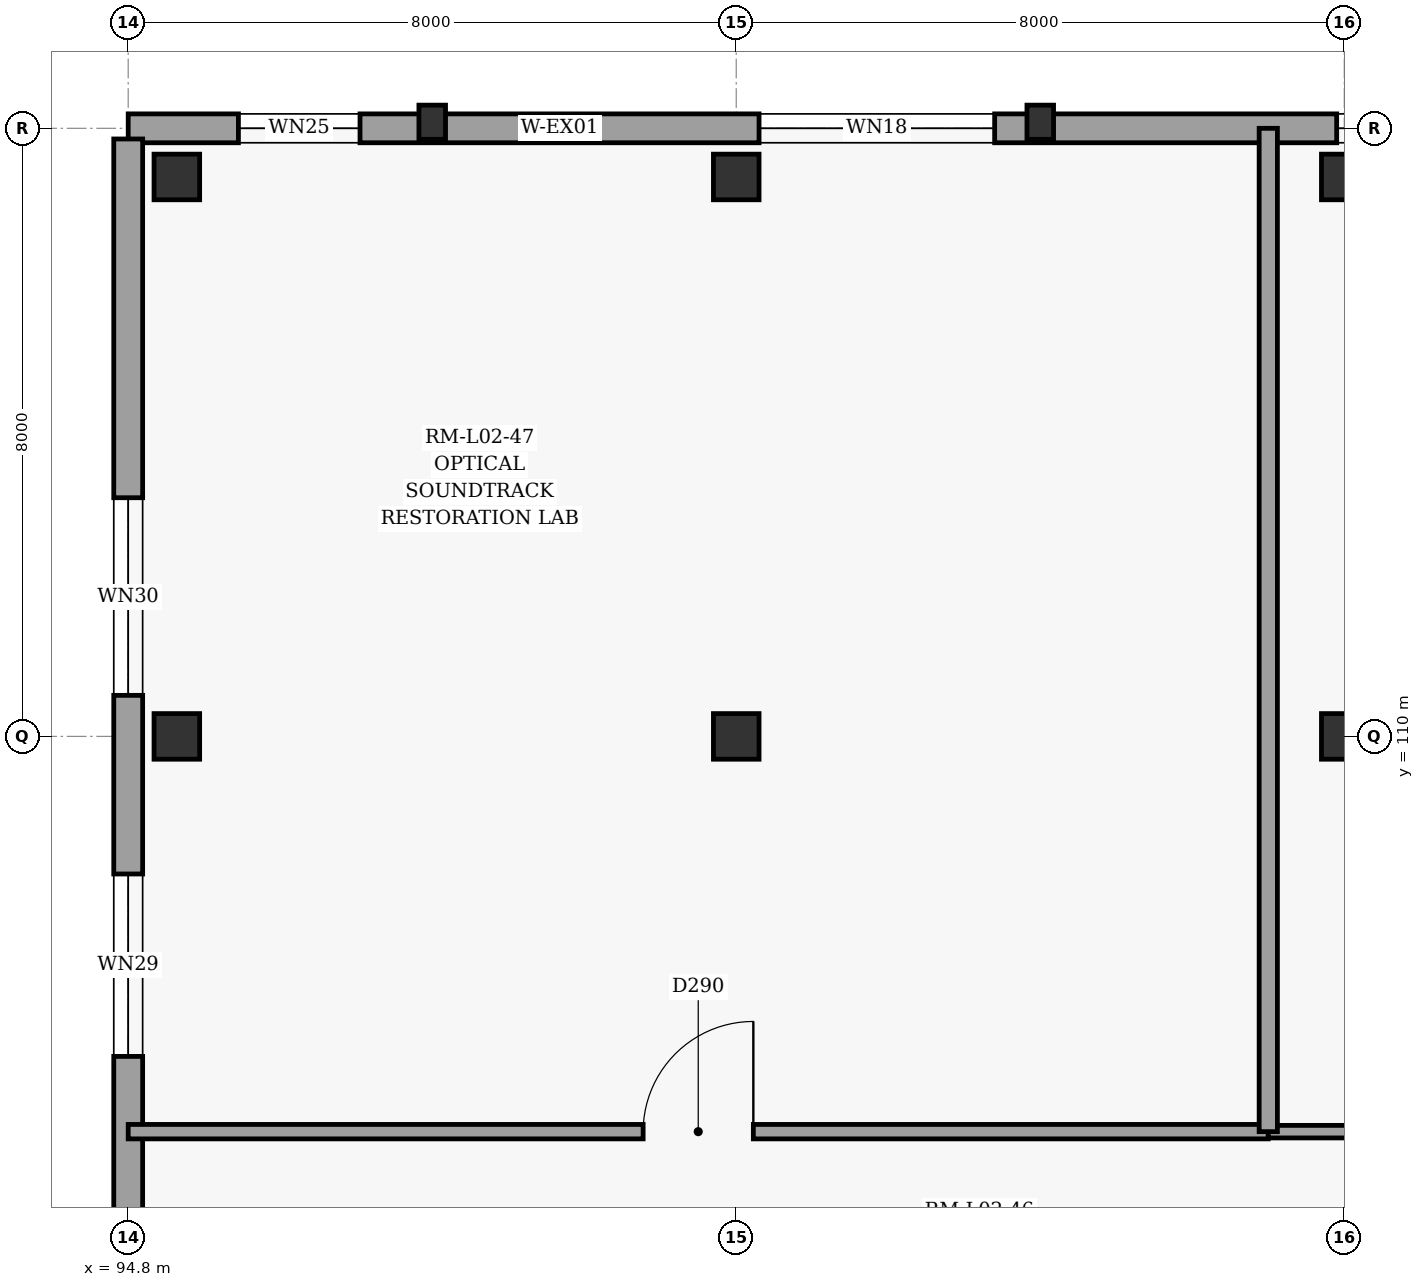
"""IFC4 building model, lengths in metres.
Left out: names, types, materials, properties, quantities, classifications, styles, units other than length and angle.
Written with IfcOpenShell. Run it as: python <this file> out.ifc"""

import sys

from ifc_helpers import new_model, si_unit, direction, frame, frame_2d, origin, origin_2d, place, context, subcontext, project, spatial, rectangle, extrude, element, fill, save


model = new_model("IFC4")
c1 = context("Model", 3, precision=1e-05, world=origin(), true_north=direction((0.0, 1.0)))
c2 = subcontext(c1, "Body", "Model", "MODEL_VIEW")
j1 = project(units=[si_unit("LENGTHUNIT", "METRE"), si_unit("PLANEANGLEUNIT", "RADIAN")], contexts=[c1])
p1 = place(None, origin())
s1 = spatial("IfcSite", under=j1, at=p1, CompositionType="ELEMENT")
p2 = place(p1, origin())
s2 = spatial("IfcBuilding", under=s1, at=p2, CompositionType="ELEMENT")
p3 = place(p2, frame((0.0, 0.0, 10.2)))
s3 = spatial("IfcBuildingStorey", under=s2, at=p3, CompositionType="ELEMENT", Elevation=10.2)
for number, where, z_axis, x_axis in (
    (1, (95.44, 110.0, 0.0), (0.0, 0.0, 1.0), (1.0, 0.0, 0.0)),
    (2, (95.44, 117.36, 0.0), (0.0, 0.0, 1.0), (1.0, 0.0, 0.0)),
    (3, (102.8, 110.0, 0.0), (0.0, 0.0, 1.0), (1.0, 0.0, 0.0)),
    (4, (102.8, 117.36, 0.0), (0.0, 0.0, 1.0), (1.0, 0.0, 0.0)),
    (5, (110.8, 110.0, 0.0), (0.0, 0.0, 1.0), (1.0, 0.0, 0.0)),
    (6, (110.8, 117.36, 0.0), (0.0, 0.0, 1.0), (1.0, 0.0, 0.0)),
):
    element("IfcColumn", number, at=place(p3, frame(where, z_axis=z_axis, x_axis=x_axis)), inside=s3, PredefinedType="COLUMN", context=c2, shape_type="SweptSolid", body=[
        extrude(rectangle(XDim=0.6, YDim=0.6, at=origin_2d()), origin(), (0.0, 0.0, 1.0), 5.4),
    ])
for number, where, z_axis, x_axis in (
    (7, (98.8, 118.08, 0.0), (0.0, 0.0, 1.0), (0.0, 1.0, 0.0)),
    (8, (106.8, 118.08, 0.0), (0.0, 0.0, 1.0), (0.0, 1.0, 0.0)),
):
    element("IfcColumn", number, at=place(p3, frame(where, z_axis=z_axis, x_axis=x_axis)), inside=s3, PredefinedType="PILASTER", context=c2, shape_type="SweptSolid", body=[
        extrude(rectangle(XDim=0.35, YDim=0.45, at=origin_2d()), origin(), (0.0, 0.0, 1.0), 5.4),
    ])
p4 = place(p3, frame((94.8, 118.0, 0.0), z_axis=(0.0, 0.0, 1.0), x_axis=(1.0, 0.0, 0.0)))
e9 = element("IfcWall", 9, at=p4, inside=s3, PredefinedType="SOLIDWALL", context=c2, shape_type="SweptSolid", body=[
    extrude(rectangle(XDim=44.795, YDim=0.38, at=frame_2d((22.397, 0.0))), origin(), (0.0, 0.0, 1.0), 5.16),
])
p5 = place(p4, frame((1.45, 0.0, 0.9)))
e10 = element("IfcOpeningElement", 10, at=p5, cuts=e9, PredefinedType="OPENING", context=c2, shape_type="SweptSolid", body=[
    extrude(rectangle(XDim=1.6, YDim=1.65, at=frame_2d((0.8, 0.825))), frame((0.0, 0.2, 0.0), z_axis=(0.0, -1.0, 0.0), x_axis=(1.0, 0.0, 0.0)), (0.0, 0.0, 1.0), 0.4),
])
p6 = place(p4, frame((8.3, 0.0, 0.9)))
e11 = element("IfcOpeningElement", 11, at=p6, cuts=e9, PredefinedType="OPENING", context=c2, shape_type="SweptSolid", body=[
    extrude(rectangle(XDim=3.1, YDim=2.45, at=frame_2d((1.55, 1.225))), frame((0.0, 0.2, 0.0), z_axis=(0.0, -1.0, 0.0), x_axis=(1.0, 0.0, 0.0)), (0.0, 0.0, 1.0), 0.4),
])
p7 = place(p4, frame((15.9, 0.0, 0.9)))
e12 = element("IfcOpeningElement", 12, at=p7, cuts=e9, PredefinedType="OPENING", context=c2, shape_type="SweptSolid", body=[
    extrude(rectangle(XDim=3.2, YDim=2.5, at=frame_2d((1.6, 1.25))), frame((0.0, 0.2, 0.0), z_axis=(0.0, -1.0, 0.0), x_axis=(1.0, 0.0, 0.0)), (0.0, 0.0, 1.0), 0.4),
])
p8 = place(p4, frame((22.75, 0.0, 0.9)))
e13 = element("IfcOpeningElement", 13, at=p8, cuts=e9, PredefinedType="OPENING", context=c2, shape_type="SweptSolid", body=[
    extrude(rectangle(XDim=3.3, YDim=2.5, at=frame_2d((1.65, 1.25))), frame((0.0, 0.2, 0.0), z_axis=(0.0, -1.0, 0.0), x_axis=(1.0, 0.0, 0.0)), (0.0, 0.0, 1.0), 0.4),
])
p9 = place(p4, frame((30.35, 0.0, 0.9)))
e14 = element("IfcOpeningElement", 14, at=p9, cuts=e9, PredefinedType="OPENING", context=c2, shape_type="SweptSolid", body=[
    extrude(rectangle(XDim=3.4, YDim=2.55, at=frame_2d((1.7, 1.275))), frame((0.0, 0.2, 0.0), z_axis=(0.0, -1.0, 0.0), x_axis=(1.0, 0.0, 0.0)), (0.0, 0.0, 1.0), 0.4),
])
p10 = place(p4, frame((36.45, 0.0, 0.9)))
e15 = element("IfcOpeningElement", 15, at=p10, cuts=e9, PredefinedType="OPENING", context=c2, shape_type="SweptSolid", body=[
    extrude(rectangle(XDim=3.5, YDim=2.55, at=frame_2d((1.75, 1.275))), frame((0.0, 0.2, 0.0), z_axis=(0.0, -1.0, 0.0), x_axis=(1.0, 0.0, 0.0)), (0.0, 0.0, 1.0), 0.4),
])
p11 = place(p3, frame((94.8, 102.14, 0.0), z_axis=(0.0, 0.0, 1.0), x_axis=(0.0, 1.0, 0.0)))
e16 = element("IfcWall", 16, at=p11, inside=s3, PredefinedType="SOLIDWALL", context=c2, shape_type="SweptSolid", body=[
    extrude(rectangle(XDim=15.72, YDim=0.38, at=frame_2d((7.86, 0.0))), origin(), (0.0, 0.0, 1.0), 5.16),
])
p12 = place(p11, frame((3.65, 0.0, 0.9)))
e17 = element("IfcOpeningElement", 17, at=p12, cuts=e16, PredefinedType="OPENING", context=c2, shape_type="SweptSolid", body=[
    extrude(rectangle(XDim=2.4, YDim=1.75, at=frame_2d((1.2, 0.875))), frame((0.0, 0.2, 0.0), z_axis=(0.0, -1.0, 0.0), x_axis=(1.0, 0.0, 0.0)), (0.0, 0.0, 1.0), 0.4),
])
p13 = place(p11, frame((8.4, 0.0, 0.9)))
e18 = element("IfcOpeningElement", 18, at=p13, cuts=e16, PredefinedType="OPENING", context=c2, shape_type="SweptSolid", body=[
    extrude(rectangle(XDim=2.6, YDim=1.75, at=frame_2d((1.3, 0.875))), frame((0.0, 0.2, 0.0), z_axis=(0.0, -1.0, 0.0), x_axis=(1.0, 0.0, 0.0)), (0.0, 0.0, 1.0), 0.4),
])
p14 = place(p3, frame((94.8, 104.8, 0.0), z_axis=(0.0, 0.0, 1.0), x_axis=(1.0, 0.0, 0.0)))
e19 = element("IfcWall", 19, at=p14, inside=s3, PredefinedType="PARTITIONING", context=c2, shape_type="SweptSolid", body=[
    extrude(rectangle(XDim=15.0, YDim=0.19, at=frame_2d((7.5, 0.0))), origin(), (0.0, 0.0, 1.0), 5.16),
])
p15 = place(p14, frame((6.775, 0.0, 0.0)))
e20 = element("IfcOpeningElement", 20, at=p15, cuts=e19, PredefinedType="OPENING", context=c2, shape_type="SweptSolid", body=[
    extrude(rectangle(XDim=1.45, YDim=2.25, at=frame_2d((0.725, 1.125))), frame((0.0, 0.105, 0.0), z_axis=(0.0, -1.0, 0.0), x_axis=(1.0, 0.0, 0.0)), (0.0, 0.0, 1.0), 0.21),
])
p16 = place(p3, frame((109.8, 104.8, 0.0), z_axis=(0.0, 0.0, 1.0), x_axis=(1.0, 0.0, 0.0)))
e21 = element("IfcWall", 21, at=p16, inside=s3, PredefinedType="PARTITIONING", context=c2, shape_type="SweptSolid", body=[
    extrude(rectangle(XDim=15.0, YDim=0.165, at=frame_2d((7.5, 0.0))), origin(), (0.0, 0.0, 1.0), 5.16),
])
p17 = place(p16, frame((6.675, 0.0, 0.0)))
e22 = element("IfcOpeningElement", 22, at=p17, cuts=e21, PredefinedType="OPENING", context=c2, shape_type="SweptSolid", body=[
    extrude(rectangle(XDim=1.65, YDim=2.3, at=frame_2d((0.825, 1.15))), frame((0.0, 0.093, 0.0), z_axis=(0.0, -1.0, 0.0), x_axis=(1.0, 0.0, 0.0)), (0.0, 0.0, 1.0), 0.185),
])
p18 = place(p3, frame((109.8, 118.0, 0.0), z_axis=(0.0, 0.0, 1.0), x_axis=(0.0, -1.0, 0.0)))
e23 = element("IfcWall", 23, at=p18, inside=s3, PredefinedType="PARTITIONING", context=c2, shape_type="SweptSolid", body=[
    extrude(rectangle(XDim=13.2, YDim=0.24, at=frame_2d((6.6, 0.0))), origin(), (0.0, 0.0, 1.0), 5.16),
])
p19 = place(p5, origin())
e24 = element("IfcWindow", 24, at=p19, inside=s3, PartitioningType="SINGLE_PANEL", PredefinedType="WINDOW", context=c2, shape_type="SweptSolid", body=[
    extrude(rectangle(XDim=1.6, YDim=1.65, at=frame_2d((0.8, 0.825))), frame((0.0, 0.03, 0.0), z_axis=(0.0, -1.0, 0.0), x_axis=(1.0, 0.0, 0.0)), (0.0, 0.0, 1.0), 0.06),
])
fill(e10, e24)
p20 = place(p6, origin())
e25 = element("IfcWindow", 25, at=p20, inside=s3, PartitioningType="SINGLE_PANEL", PredefinedType="WINDOW", context=c2, shape_type="SweptSolid", body=[
    extrude(rectangle(XDim=3.1, YDim=2.45, at=frame_2d((1.55, 1.225))), frame((0.0, 0.03, 0.0), z_axis=(0.0, -1.0, 0.0), x_axis=(1.0, 0.0, 0.0)), (0.0, 0.0, 1.0), 0.06),
])
fill(e11, e25)
p21 = place(p7, origin())
e26 = element("IfcWindow", 26, at=p21, inside=s3, PartitioningType="SINGLE_PANEL", PredefinedType="WINDOW", context=c2, shape_type="SweptSolid", body=[
    extrude(rectangle(XDim=3.2, YDim=2.5, at=frame_2d((1.6, 1.25))), frame((0.0, 0.03, 0.0), z_axis=(0.0, -1.0, 0.0), x_axis=(1.0, 0.0, 0.0)), (0.0, 0.0, 1.0), 0.06),
])
fill(e12, e26)
p22 = place(p12, origin())
e27 = element("IfcWindow", 27, at=p22, inside=s3, PartitioningType="SINGLE_PANEL", PredefinedType="WINDOW", context=c2, shape_type="SweptSolid", body=[
    extrude(rectangle(XDim=2.4, YDim=1.75, at=frame_2d((1.2, 0.875))), frame((0.0, 0.03, 0.0), z_axis=(0.0, -1.0, 0.0), x_axis=(1.0, 0.0, 0.0)), (0.0, 0.0, 1.0), 0.06),
])
fill(e17, e27)
p23 = place(p13, origin())
e28 = element("IfcWindow", 28, at=p23, inside=s3, PartitioningType="SINGLE_PANEL", PredefinedType="WINDOW", context=c2, shape_type="SweptSolid", body=[
    extrude(rectangle(XDim=2.6, YDim=1.75, at=frame_2d((1.3, 0.875))), frame((0.0, 0.03, 0.0), z_axis=(0.0, -1.0, 0.0), x_axis=(1.0, 0.0, 0.0)), (0.0, 0.0, 1.0), 0.06),
])
fill(e18, e28)
p24 = place(p15, origin())
e29 = element("IfcDoor", 29, at=p24, inside=s3, OperationType="SINGLE_SWING_RIGHT", PredefinedType="DOOR", context=c2, shape_type="SweptSolid", body=[
    extrude(rectangle(XDim=1.45, YDim=2.25, at=frame_2d((0.725, 1.125))), frame((0.0, 0.025, 0.0), z_axis=(0.0, -1.0, 0.0), x_axis=(1.0, 0.0, 0.0)), (0.0, 0.0, 1.0), 0.05),
])
fill(e20, e29)
save(model, sys.argv[1])
